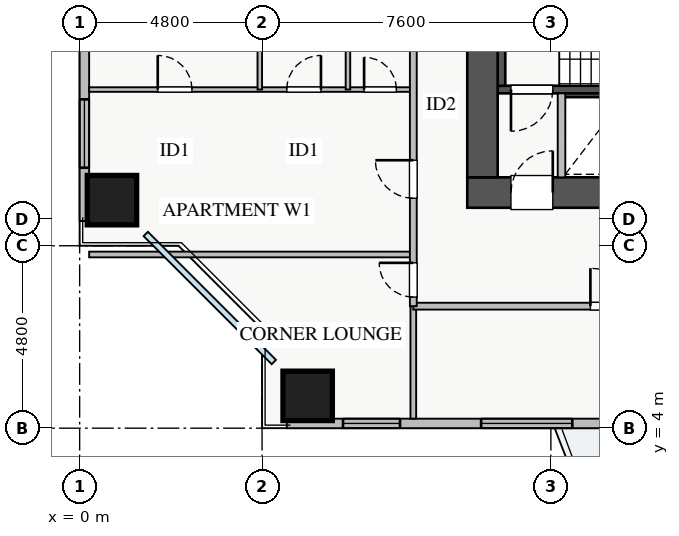
"""IFC4 building model, lengths in metres.
Left out: names, types, materials, properties, quantities, classifications, styles, units other than length and angle.
Written with IfcOpenShell. Run it as: python <this file> out.ifc"""

import sys

from ifc_helpers import new_model, si_unit, direction, frame, frame_2d, origin, origin_2d, place, context, subcontext, project, spatial, rectangle, extrude, source, transform, mapped, element, fill, save


model = new_model("IFC4")
c1 = context("Model", 3, precision=1e-05, world=origin(), true_north=direction((0.0, 1.0)))
c2 = subcontext(c1, "Body", "Model", "MODEL_VIEW")
j1 = project(units=[si_unit("LENGTHUNIT", "METRE"), si_unit("PLANEANGLEUNIT", "RADIAN")], contexts=[c1])
p1 = place(None, origin())
s1 = spatial("IfcSite", under=j1, at=p1, CompositionType="ELEMENT")
p2 = place(p1, origin())
s2 = spatial("IfcBuilding", under=s1, at=p2, CompositionType="ELEMENT")
p3 = place(p2, frame((0.0, 0.0, 69.75)))
s3 = spatial("IfcBuildingStorey", under=s2, at=p3, CompositionType="ELEMENT", Elevation=69.75)
p4 = place(p3, frame((12.68, 12.8, 0.0), z_axis=(0.0, 0.0, 1.0), x_axis=(1.0, 0.0, 0.0)))
e1 = element("IfcWall", 1, at=p4, inside=s3, PredefinedType="SHEAR", context=c2, shape_type="SweptSolid", body=[
    extrude(rectangle(XDim=1.94, YDim=0.18, at=frame_2d((0.97, 0.0))), origin(), (0.0, 0.0, 1.0), 3.07),
])
p5 = place(p3, frame((11.0, 12.91, 0.0), z_axis=(0.0, 0.0, 1.0), x_axis=(1.0, 0.0, 0.0)))
e2 = element("IfcWall", 2, at=p5, inside=s3, PredefinedType="SHEAR", context=c2, shape_type="SweptSolid", body=[
    extrude(rectangle(XDim=7.15, YDim=0.2, at=frame_2d((3.575, 0.0))), origin(), (0.0, 0.0, 1.0), 3.25),
])
p6 = place(p5, frame((0.35, 0.0, 0.0)))
e3 = element("IfcOpeningElement", 3, at=p6, cuts=e2, PredefinedType="OPENING", context=c2, shape_type="SweptSolid", body=[
    extrude(rectangle(XDim=1.1, YDim=2.05, at=frame_2d((0.55, 1.025))), frame((0.0, 0.11, 0.0), z_axis=(0.0, -1.0, 0.0), x_axis=(1.0, 0.0, 0.0)), (0.0, 0.0, 1.0), 0.22),
])
p7 = place(p3, frame((11.1, 13.01, 0.0), z_axis=(0.0, 0.0, 1.0), x_axis=(0.0, 1.0, 0.0)))
e4 = element("IfcWall", 4, at=p7, inside=s3, PredefinedType="SHEAR", context=c2, shape_type="SweptSolid", body=[
    extrude(rectangle(XDim=2.94, YDim=0.2, at=frame_2d((1.47, 0.0))), origin(), (0.0, 0.0, 1.0), 3.25),
])
p8 = place(p3, frame((10.2, 10.2, 0.0), z_axis=(0.0, 0.0, 1.0), x_axis=(1.0, 0.0, 0.0)))
e5 = element("IfcWall", 5, at=p8, inside=s3, PredefinedType="SHEAR", context=c2, shape_type="SweptSolid", body=[
    extrude(rectangle(XDim=17.6, YDim=0.8, at=frame_2d((8.8, 0.0))), origin(), (0.0, 0.0, 1.0), 3.25),
])
p9 = place(p8, frame((1.15, 0.0, 0.0)))
e6 = element("IfcOpeningElement", 6, at=p9, cuts=e5, PredefinedType="OPENING", context=c2, shape_type="SweptSolid", body=[
    extrude(rectangle(XDim=1.1, YDim=2.05, at=frame_2d((0.55, 1.025))), frame((0.0, 0.41, 0.0), z_axis=(0.0, -1.0, 0.0), x_axis=(1.0, 0.0, 0.0)), (0.0, 0.0, 1.0), 0.82),
])
p10 = place(p8, frame((8.3, 0.0, 0.0)))
e7 = element("IfcOpeningElement", 7, at=p10, cuts=e5, PredefinedType="OPENING", context=c2, shape_type="SweptSolid", body=[
    extrude(rectangle(XDim=1.1, YDim=2.05, at=frame_2d((0.55, 1.025))), frame((0.0, 0.41, 0.0), z_axis=(0.0, -1.0, 0.0), x_axis=(1.0, 0.0, 0.0)), (0.0, 0.0, 1.0), 0.82),
])
p11 = place(p8, frame((10.05, 0.0, 0.0)))
e8 = element("IfcOpeningElement", 8, at=p11, cuts=e5, PredefinedType="OPENING", context=c2, shape_type="SweptSolid", body=[
    extrude(rectangle(XDim=1.1, YDim=2.05, at=frame_2d((0.55, 1.025))), frame((0.0, 0.41, 0.0), z_axis=(0.0, -1.0, 0.0), x_axis=(1.0, 0.0, 0.0)), (0.0, 0.0, 1.0), 0.82),
])
p12 = place(p8, frame((14.74, 0.0, 0.0)))
e9 = element("IfcOpeningElement", 9, at=p12, cuts=e5, PredefinedType="OPENING", context=c2, shape_type="SweptSolid", body=[
    extrude(rectangle(XDim=1.0, YDim=2.05, at=frame_2d((0.5, 1.025))), frame((0.0, 0.41, 0.0), z_axis=(0.0, -1.0, 0.0), x_axis=(1.0, 0.0, 0.0)), (0.0, 0.0, 1.0), 0.82),
])
p13 = place(p8, frame((12.585, 0.0, 0.0)))
e10 = element("IfcOpeningElement", 10, at=p13, cuts=e5, PredefinedType="OPENING", context=c2, shape_type="SweptSolid", body=[
    extrude(rectangle(XDim=1.0, YDim=2.05, at=frame_2d((0.5, 1.025))), frame((0.0, 0.41, 0.0), z_axis=(0.0, -1.0, 0.0), x_axis=(1.0, 0.0, 0.0)), (0.0, 0.0, 1.0), 0.82),
])
p14 = place(p3, frame((10.6, 10.6, 0.0), z_axis=(0.0, 0.0, 1.0), x_axis=(0.0, 1.0, 0.0)))
e11 = element("IfcWall", 11, at=p14, inside=s3, PredefinedType="SHEAR", context=c2, shape_type="SweptSolid", body=[
    extrude(rectangle(XDim=5.6, YDim=0.8, at=frame_2d((2.8, 0.0))), origin(), (0.0, 0.0, 1.0), 3.25),
])
m1 = source(origin(), c2, "Body", "SweptSolid", [
    extrude(rectangle(XDim=1.3, YDim=1.3, at=origin_2d()), origin(), (0.0, 0.0, 1.0), 3.25),
])
for number, where, z_axis, x_axis in (
    (12, (6.0, 4.85, 0.0), (0.0, 0.0, 1.0), (1.0, 0.0, 0.0)),
    (13, (0.85, 10.0, 0.0), (0.0, 0.0, 1.0), (1.0, 0.0, 0.0)),
):
    element("IfcColumn", number, at=place(p3, frame(where, z_axis=z_axis, x_axis=x_axis)), inside=s3, PredefinedType="COLUMN", context=c2, shape_type="MappedRepresentation", body=[
        mapped(m1, transform((0.0, 0.0, 0.0), x_axis=(1.0, 0.0, 0.0), y_axis=(0.0, 1.0, 0.0), z_axis=(0.0, 0.0, 1.0), scale=1.0)),
    ])
p15 = place(p3, frame((5.45, 4.125, 0.0), z_axis=(0.0, 0.0, 1.0), x_axis=(1.0, 0.0, 0.0)))
e14 = element("IfcWall", 14, at=p15, inside=s3, PredefinedType="STANDARD", context=c2, shape_type="SweptSolid", body=[
    extrude(rectangle(XDim=27.1, YDim=0.25, at=frame_2d((13.55, 0.0))), origin(), (0.0, 0.0, 1.0), 2.61),
])
p16 = place(p15, frame((14.4, 0.0, 0.0)))
e15 = element("IfcOpeningElement", 15, at=p16, cuts=e14, PredefinedType="OPENING", context=c2, shape_type="SweptSolid", body=[
    extrude(rectangle(XDim=1.2, YDim=2.1, at=frame_2d((0.6, 1.05))), frame((0.0, 0.135, 0.0), z_axis=(0.0, -1.0, 0.0), x_axis=(1.0, 0.0, 0.0)), (0.0, 0.0, 1.0), 0.27),
])
p17 = place(p15, frame((1.48, 0.0, 0.9)))
e16 = element("IfcOpeningElement", 16, at=p17, cuts=e14, PredefinedType="OPENING", context=c2, shape_type="SweptSolid", body=[
    extrude(rectangle(XDim=1.5, YDim=1.5, at=frame_2d((0.75, 0.75))), frame((0.0, 0.135, 0.0), z_axis=(0.0, -1.0, 0.0), x_axis=(1.0, 0.0, 0.0)), (0.0, 0.0, 1.0), 0.27),
])
p18 = place(p15, frame((9.263, 0.0, 0.9)))
e17 = element("IfcOpeningElement", 17, at=p18, cuts=e14, PredefinedType="OPENING", context=c2, shape_type="SweptSolid", body=[
    extrude(rectangle(XDim=1.8, YDim=1.45, at=frame_2d((0.9, 0.725))), frame((0.0, 0.135, 0.0), z_axis=(0.0, -1.0, 0.0), x_axis=(1.0, 0.0, 0.0)), (0.0, 0.0, 1.0), 0.27),
])
p19 = place(p15, frame((16.188, 0.0, 0.9)))
e18 = element("IfcOpeningElement", 18, at=p19, cuts=e14, PredefinedType="OPENING", context=c2, shape_type="SweptSolid", body=[
    extrude(rectangle(XDim=1.5, YDim=1.45, at=frame_2d((0.75, 0.725))), frame((0.0, 0.135, 0.0), z_axis=(0.0, -1.0, 0.0), x_axis=(1.0, 0.0, 0.0)), (0.0, 0.0, 1.0), 0.27),
])
p20 = place(p15, frame((22.663, 0.0, 0.9)))
e19 = element("IfcOpeningElement", 19, at=p20, cuts=e14, PredefinedType="OPENING", context=c2, shape_type="SweptSolid", body=[
    extrude(rectangle(XDim=2.1, YDim=1.48, at=frame_2d((1.05, 0.74))), frame((0.0, 0.135, 0.0), z_axis=(0.0, -1.0, 0.0), x_axis=(1.0, 0.0, 0.0)), (0.0, 0.0, 1.0), 0.27),
])
p21 = place(p15, frame((5.114, 0.0, 0.9)))
e20 = element("IfcOpeningElement", 20, at=p21, cuts=e14, PredefinedType="OPENING", context=c2, shape_type="SweptSolid", body=[
    extrude(rectangle(XDim=2.4, YDim=1.5, at=frame_2d((1.2, 0.75))), frame((0.0, 0.135, 0.0), z_axis=(0.0, -1.0, 0.0), x_axis=(1.0, 0.0, 0.0)), (0.0, 0.0, 1.0), 0.27),
])
p22 = place(p3, frame((0.125, 9.45, 0.0), z_axis=(0.0, 0.0, 1.0), x_axis=(0.0, 1.0, 0.0)))
e21 = element("IfcWall", 21, at=p22, inside=s3, PredefinedType="STANDARD", context=c2, shape_type="SweptSolid", body=[
    extrude(rectangle(XDim=27.1, YDim=0.25, at=frame_2d((13.55, 0.0))), origin(), (0.0, 0.0, 1.0), 2.61),
])
p23 = place(p22, frame((14.4, 0.0, 0.0)))
e22 = element("IfcOpeningElement", 22, at=p23, cuts=e21, PredefinedType="OPENING", context=c2, shape_type="SweptSolid", body=[
    extrude(rectangle(XDim=1.2, YDim=2.1, at=frame_2d((0.6, 1.05))), frame((0.0, 0.135, 0.0), z_axis=(0.0, -1.0, 0.0), x_axis=(1.0, 0.0, 0.0)), (0.0, 0.0, 1.0), 0.27),
])
p24 = place(p22, frame((1.403, 0.0, 0.9)))
e23 = element("IfcOpeningElement", 23, at=p24, cuts=e21, PredefinedType="OPENING", context=c2, shape_type="SweptSolid", body=[
    extrude(rectangle(XDim=1.8, YDim=1.5, at=frame_2d((0.9, 0.75))), frame((0.0, 0.135, 0.0), z_axis=(0.0, -1.0, 0.0), x_axis=(1.0, 0.0, 0.0)), (0.0, 0.0, 1.0), 0.27),
])
p25 = place(p22, frame((22.663, 0.0, 0.9)))
e24 = element("IfcOpeningElement", 24, at=p25, cuts=e21, PredefinedType="OPENING", context=c2, shape_type="SweptSolid", body=[
    extrude(rectangle(XDim=2.1, YDim=1.48, at=frame_2d((1.05, 0.74))), frame((0.0, 0.135, 0.0), z_axis=(0.0, -1.0, 0.0), x_axis=(1.0, 0.0, 0.0)), (0.0, 0.0, 1.0), 0.27),
])
p26 = place(p22, frame((4.607, 0.0, 0.9)))
e25 = element("IfcOpeningElement", 25, at=p26, cuts=e21, PredefinedType="OPENING", context=c2, shape_type="SweptSolid", body=[
    extrude(rectangle(XDim=2.4, YDim=1.5, at=frame_2d((1.2, 0.75))), frame((0.0, 0.135, 0.0), z_axis=(0.0, -1.0, 0.0), x_axis=(1.0, 0.0, 0.0)), (0.0, 0.0, 1.0), 0.27),
])
p27 = place(p22, frame((13.17, 0.0, 0.9)))
e26 = element("IfcOpeningElement", 26, at=p27, cuts=e21, PredefinedType="OPENING", context=c2, shape_type="SweptSolid", body=[
    extrude(rectangle(XDim=0.9, YDim=1.2, at=frame_2d((0.45, 0.6))), frame((0.0, 0.135, 0.0), z_axis=(0.0, -1.0, 0.0), x_axis=(1.0, 0.0, 0.0)), (0.0, 0.0, 1.0), 0.27),
])
p28 = place(p22, frame((8.405, 0.0, 0.9)))
e27 = element("IfcOpeningElement", 27, at=p28, cuts=e21, PredefinedType="OPENING", context=c2, shape_type="SweptSolid", body=[
    extrude(rectangle(XDim=0.9, YDim=1.2, at=frame_2d((0.45, 0.6))), frame((0.0, 0.135, 0.0), z_axis=(0.0, -1.0, 0.0), x_axis=(1.0, 0.0, 0.0)), (0.0, 0.0, 1.0), 0.27),
])
p29 = place(p3, frame((12.68, 10.6, 0.0), z_axis=(0.0, 0.0, 1.0), x_axis=(0.0, 1.0, 0.0)))
e28 = element("IfcWall", 28, at=p29, inside=s3, PredefinedType="PARTITIONING", context=c2, shape_type="SweptSolid", body=[
    extrude(rectangle(XDim=2.21, YDim=0.2, at=frame_2d((1.105, 0.0))), origin(), (0.0, 0.0, 1.0), 3.07),
])
p30 = place(p3, frame((8.78, 4.25, 0.0), z_axis=(0.0, 0.0, 1.0), x_axis=(0.0, 1.0, 0.0)))
e29 = element("IfcWall", 29, at=p30, inside=s3, PredefinedType="PARTITIONING", context=c2, shape_type="SweptSolid", body=[
    extrude(rectangle(XDim=2.96, YDim=0.15, at=frame_2d((1.48, 0.0))), origin(), (0.0, 0.0, 1.0), 3.07),
])
p31 = place(p3, frame((8.78, 7.21, 0.0), z_axis=(0.0, 0.0, 1.0), x_axis=(1.0, 0.0, 0.0)))
e30 = element("IfcWall", 30, at=p31, inside=s3, PredefinedType="PARTITIONING", context=c2, shape_type="SweptSolid", body=[
    extrude(rectangle(XDim=23.54, YDim=0.18, at=frame_2d((11.77, 0.0))), origin(), (0.0, 0.0, 1.0), 3.07),
])
p32 = place(p31, frame((4.66, 0.0, 0.0)))
e31 = element("IfcOpeningElement", 31, at=p32, cuts=e30, PredefinedType="OPENING", context=c2, shape_type="SweptSolid", body=[
    extrude(rectangle(XDim=1.0, YDim=2.05, at=frame_2d((0.5, 1.025))), frame((0.0, 0.1, 0.0), z_axis=(0.0, -1.0, 0.0), x_axis=(1.0, 0.0, 0.0)), (0.0, 0.0, 1.0), 0.2),
])
p33 = place(p31, frame((16.43, 0.0, 0.0)))
e32 = element("IfcOpeningElement", 32, at=p33, cuts=e30, PredefinedType="OPENING", context=c2, shape_type="SweptSolid", body=[
    extrude(rectangle(XDim=1.0, YDim=2.05, at=frame_2d((0.5, 1.025))), frame((0.0, 0.1, 0.0), z_axis=(0.0, -1.0, 0.0), x_axis=(1.0, 0.0, 0.0)), (0.0, 0.0, 1.0), 0.2),
])
p34 = place(p3, frame((0.25, 8.57, 0.0), z_axis=(0.0, 0.0, 1.0), x_axis=(1.0, 0.0, 0.0)))
e33 = element("IfcWall", 33, at=p34, inside=s3, PredefinedType="PARTITIONING", context=c2, shape_type="SweptSolid", body=[
    extrude(rectangle(XDim=8.53, YDim=0.15, at=frame_2d((4.265, 0.0))), origin(), (0.0, 0.0, 1.0), 3.07),
])
p35 = place(p3, frame((0.25, 12.91, 0.0), z_axis=(0.0, 0.0, 1.0), x_axis=(1.0, 0.0, 0.0)))
e34 = element("IfcWall", 34, at=p35, inside=s3, PredefinedType="PLUMBINGWALL", context=c2, shape_type="SweptSolid", body=[
    extrude(rectangle(XDim=8.53, YDim=0.12, at=frame_2d((4.265, 0.0))), origin(), (0.0, 0.0, 1.0), 3.07),
])
p36 = place(p35, frame((1.805, 0.0, 0.0)))
e35 = element("IfcOpeningElement", 35, at=p36, cuts=e34, PredefinedType="OPENING", context=c2, shape_type="SweptSolid", body=[
    extrude(rectangle(XDim=0.9, YDim=2.05, at=frame_2d((0.45, 1.025))), frame((0.0, 0.07, 0.0), z_axis=(0.0, -1.0, 0.0), x_axis=(1.0, 0.0, 0.0)), (0.0, 0.0, 1.0), 0.14),
])
p37 = place(p35, frame((5.2, 0.0, 0.0)))
e36 = element("IfcOpeningElement", 36, at=p37, cuts=e34, PredefinedType="OPENING", context=c2, shape_type="SweptSolid", body=[
    extrude(rectangle(XDim=0.9, YDim=2.05, at=frame_2d((0.45, 1.025))), frame((0.0, 0.07, 0.0), z_axis=(0.0, -1.0, 0.0), x_axis=(1.0, 0.0, 0.0)), (0.0, 0.0, 1.0), 0.14),
])
p38 = place(p35, frame((7.235, 0.0, 0.0)))
e37 = element("IfcOpeningElement", 37, at=p38, cuts=e34, PredefinedType="OPENING", context=c2, shape_type="SweptSolid", body=[
    extrude(rectangle(XDim=0.85, YDim=2.05, at=frame_2d((0.425, 1.025))), frame((0.0, 0.07, 0.0), z_axis=(0.0, -1.0, 0.0), x_axis=(1.0, 0.0, 0.0)), (0.0, 0.0, 1.0), 0.14),
])
for number, where, z_axis, x_axis in (
    (38, (4.74, 12.91, 0.0), (0.0, 0.0, 1.0), (0.0, 1.0, 0.0)),
    (39, (7.06, 12.91, 0.0), (0.0, 0.0, 1.0), (0.0, 1.0, 0.0)),
):
    element("IfcWall", number, at=place(p3, frame(where, z_axis=z_axis, x_axis=x_axis)), inside=s3, PredefinedType="PLUMBINGWALL", context=c2, shape_type="SweptSolid", body=[
        extrude(rectangle(XDim=4.71, YDim=0.12, at=frame_2d((2.355, 0.0))), origin(), (0.0, 0.0, 1.0), 3.07),
    ])
p39 = place(p3, frame((8.78, 7.21, 0.0), z_axis=(0.0, 0.0, 1.0), x_axis=(0.0, 1.0, 0.0)))
e40 = element("IfcWall", 40, at=p39, inside=s3, PredefinedType="PARTITIONING", context=c2, shape_type="SweptSolid", body=[
    extrude(rectangle(XDim=31.23, YDim=0.18, at=frame_2d((15.615, 0.0))), origin(), (0.0, 0.0, 1.0), 3.07),
])
p40 = place(p39, frame((30.09, 0.0, 0.0)))
e41 = element("IfcOpeningElement", 41, at=p40, cuts=e40, PredefinedType="OPENING", context=c2, shape_type="SweptSolid", body=[
    extrude(rectangle(XDim=0.9, YDim=2.05, at=frame_2d((0.45, 1.025))), frame((0.0, 0.1, 0.0), z_axis=(0.0, -1.0, 0.0), x_axis=(1.0, 0.0, 0.0)), (0.0, 0.0, 1.0), 0.2),
])
p41 = place(p39, frame((0.24, 0.0, 0.0)))
e42 = element("IfcOpeningElement", 42, at=p41, cuts=e40, PredefinedType="OPENING", context=c2, shape_type="SweptSolid", body=[
    extrude(rectangle(XDim=0.9, YDim=2.05, at=frame_2d((0.45, 1.025))), frame((0.0, 0.1, 0.0), z_axis=(0.0, -1.0, 0.0), x_axis=(1.0, 0.0, 0.0)), (0.0, 0.0, 1.0), 0.2),
])
p42 = place(p39, frame((2.84, 0.0, 0.0)))
e43 = element("IfcOpeningElement", 43, at=p42, cuts=e40, PredefinedType="OPENING", context=c2, shape_type="SweptSolid", body=[
    extrude(rectangle(XDim=1.0, YDim=2.05, at=frame_2d((0.5, 1.025))), frame((0.0, 0.1, 0.0), z_axis=(0.0, -1.0, 0.0), x_axis=(1.0, 0.0, 0.0)), (0.0, 0.0, 1.0), 0.2),
])
p43 = place(p39, frame((12.11, 0.0, 0.0)))
e44 = element("IfcOpeningElement", 44, at=p43, cuts=e40, PredefinedType="OPENING", context=c2, shape_type="SweptSolid", body=[
    extrude(rectangle(XDim=1.0, YDim=2.05, at=frame_2d((0.5, 1.025))), frame((0.0, 0.1, 0.0), z_axis=(0.0, -1.0, 0.0), x_axis=(1.0, 0.0, 0.0)), (0.0, 0.0, 1.0), 0.2),
])
p44 = place(p39, frame((24.62, 0.0, 0.0)))
e45 = element("IfcOpeningElement", 45, at=p44, cuts=e40, PredefinedType="OPENING", context=c2, shape_type="SweptSolid", body=[
    extrude(rectangle(XDim=1.0, YDim=2.05, at=frame_2d((0.5, 1.025))), frame((0.0, 0.1, 0.0), z_axis=(0.0, -1.0, 0.0), x_axis=(1.0, 0.0, 0.0)), (0.0, 0.0, 1.0), 0.2),
])
m2 = source(origin(), c2, "Body", "SweptSolid", [
    extrude(rectangle(XDim=1.5, YDim=1.5, at=frame_2d((0.75, 0.75))), frame((0.0, 0.03, 0.0), z_axis=(0.0, -1.0, 0.0), x_axis=(1.0, 0.0, 0.0)), (0.0, 0.0, 1.0), 0.06),
])
p45 = place(p17, origin())
e46 = element("IfcWindow", 46, at=p45, inside=s3, PartitioningType="TRIPLE_PANEL_VERTICAL", PredefinedType="WINDOW", context=c2, shape_type="MappedRepresentation", body=[
    mapped(m2, transform((0.0, 0.0, 0.0), x_axis=(1.0, 0.0, 0.0), y_axis=(0.0, 1.0, 0.0), z_axis=(0.0, 0.0, 1.0), scale=1.0)),
])
fill(e16, e46)
m3 = source(origin(), c2, "Body", "SweptSolid", [
    extrude(rectangle(XDim=1.8, YDim=1.5, at=frame_2d((0.9, 0.75))), frame((0.0, 0.03, 0.0), z_axis=(0.0, -1.0, 0.0), x_axis=(1.0, 0.0, 0.0)), (0.0, 0.0, 1.0), 0.06),
])
p46 = place(p24, origin())
e47 = element("IfcWindow", 47, at=p46, inside=s3, PartitioningType="TRIPLE_PANEL_VERTICAL", PredefinedType="WINDOW", context=c2, shape_type="MappedRepresentation", body=[
    mapped(m3, transform((0.0, 0.0, 0.0), x_axis=(1.0, 0.0, 0.0), y_axis=(0.0, 1.0, 0.0), z_axis=(0.0, 0.0, 1.0), scale=1.0)),
])
fill(e23, e47)
m4 = source(origin(), c2, "Body", "SweptSolid", [
    extrude(rectangle(XDim=1.1, YDim=2.05, at=frame_2d((0.55, 1.025))), frame((0.0, 0.025, 0.0), z_axis=(0.0, -1.0, 0.0), x_axis=(1.0, 0.0, 0.0)), (0.0, 0.0, 1.0), 0.05),
])
p47 = place(p9, origin())
e48 = element("IfcDoor", 48, at=p47, inside=s3, OperationType="SINGLE_SWING_RIGHT", PredefinedType="DOOR", context=c2, shape_type="MappedRepresentation", body=[
    mapped(m4, transform((0.0, 0.0, 0.0), x_axis=(1.0, 0.0, 0.0), y_axis=(0.0, 1.0, 0.0), z_axis=(0.0, 0.0, 1.0), scale=1.0)),
])
fill(e6, e48)
p48 = place(p6, frame((1.1, 0.0, 0.0), z_axis=(0.0, 0.0, 1.0), x_axis=(-1.0, 0.0, 0.0)))
e49 = element("IfcDoor", 49, at=p48, inside=s3, OperationType="SINGLE_SWING_LEFT", PredefinedType="DOOR", context=c2, shape_type="MappedRepresentation", body=[
    mapped(m4, transform((0.0, 0.0, 0.0), x_axis=(1.0, 0.0, 0.0), y_axis=(0.0, 1.0, 0.0), z_axis=(0.0, 0.0, 1.0), scale=1.0)),
])
fill(e3, e49)
m5 = source(origin(), c2, "Body", "SweptSolid", [
    extrude(rectangle(XDim=1.0, YDim=2.05, at=frame_2d((0.5, 1.025))), frame((0.0, 0.025, 0.0), z_axis=(0.0, -1.0, 0.0), x_axis=(1.0, 0.0, 0.0)), (0.0, 0.0, 1.0), 0.05),
])
p49 = place(p32, origin())
e50 = element("IfcDoor", 50, at=p49, inside=s3, OperationType="SINGLE_SWING_LEFT", PredefinedType="DOOR", context=c2, shape_type="MappedRepresentation", body=[
    mapped(m5, transform((0.0, 0.0, 0.0), x_axis=(1.0, 0.0, 0.0), y_axis=(0.0, 1.0, 0.0), z_axis=(0.0, 0.0, 1.0), scale=1.0)),
])
fill(e31, e50)
m6 = source(origin(), c2, "Body", "SweptSolid", [
    extrude(rectangle(XDim=0.9, YDim=2.05, at=frame_2d((0.45, 1.025))), frame((0.0, 0.025, 0.0), z_axis=(0.0, -1.0, 0.0), x_axis=(1.0, 0.0, 0.0)), (0.0, 0.0, 1.0), 0.05),
])
p50 = place(p36, origin())
e51 = element("IfcDoor", 51, at=p50, inside=s3, OperationType="SINGLE_SWING_LEFT", PredefinedType="DOOR", context=c2, shape_type="MappedRepresentation", body=[
    mapped(m6, transform((0.0, 0.0, 0.0), x_axis=(1.0, 0.0, 0.0), y_axis=(0.0, 1.0, 0.0), z_axis=(0.0, 0.0, 1.0), scale=1.0)),
])
fill(e35, e51)
p51 = place(p37, origin())
e52 = element("IfcDoor", 52, at=p51, inside=s3, OperationType="SINGLE_SWING_RIGHT", PredefinedType="DOOR", context=c2, shape_type="MappedRepresentation", body=[
    mapped(m6, transform((0.0, 0.0, 0.0), x_axis=(1.0, 0.0, 0.0), y_axis=(0.0, 1.0, 0.0), z_axis=(0.0, 0.0, 1.0), scale=1.0)),
])
fill(e36, e52)
m7 = source(origin(), c2, "Body", "SweptSolid", [
    extrude(rectangle(XDim=0.85, YDim=2.05, at=frame_2d((0.425, 1.025))), frame((0.0, 0.025, 0.0), z_axis=(0.0, -1.0, 0.0), x_axis=(1.0, 0.0, 0.0)), (0.0, 0.0, 1.0), 0.05),
])
p52 = place(p38, origin())
e53 = element("IfcDoor", 53, at=p52, inside=s3, OperationType="SINGLE_SWING_LEFT", PredefinedType="DOOR", context=c2, shape_type="MappedRepresentation", body=[
    mapped(m7, transform((0.0, 0.0, 0.0), x_axis=(1.0, 0.0, 0.0), y_axis=(0.0, 1.0, 0.0), z_axis=(0.0, 0.0, 1.0), scale=1.0)),
])
fill(e37, e53)
p53 = place(p41, origin())
e54 = element("IfcDoor", 54, at=p53, inside=s3, OperationType="SINGLE_SWING_RIGHT", PredefinedType="DOOR", context=c2, shape_type="MappedRepresentation", body=[
    mapped(m6, transform((0.0, 0.0, 0.0), x_axis=(1.0, 0.0, 0.0), y_axis=(0.0, 1.0, 0.0), z_axis=(0.0, 0.0, 1.0), scale=1.0)),
])
fill(e42, e54)
p54 = place(p42, origin())
e55 = element("IfcDoor", 55, at=p54, inside=s3, OperationType="SINGLE_SWING_RIGHT", PredefinedType="DOOR", context=c2, shape_type="MappedRepresentation", body=[
    mapped(m5, transform((0.0, 0.0, 0.0), x_axis=(1.0, 0.0, 0.0), y_axis=(0.0, 1.0, 0.0), z_axis=(0.0, 0.0, 1.0), scale=1.0)),
])
fill(e43, e55)
m8 = source(origin(), c2, "Body", "SweptSolid", [
    extrude(rectangle(XDim=2.4, YDim=1.5, at=frame_2d((1.2, 0.75))), frame((0.0, 0.03, 0.0), z_axis=(0.0, -1.0, 0.0), x_axis=(1.0, 0.0, 0.0)), (0.0, 0.0, 1.0), 0.06),
])
p55 = place(p21, origin())
e56 = element("IfcWindow", 56, at=p55, inside=s3, PartitioningType="TRIPLE_PANEL_VERTICAL", PredefinedType="WINDOW", context=c2, shape_type="MappedRepresentation", body=[
    mapped(m8, transform((0.0, 0.0, 0.0), x_axis=(1.0, 0.0, 0.0), y_axis=(0.0, 1.0, 0.0), z_axis=(0.0, 0.0, 1.0), scale=1.0)),
])
fill(e20, e56)
save(model, sys.argv[1])
